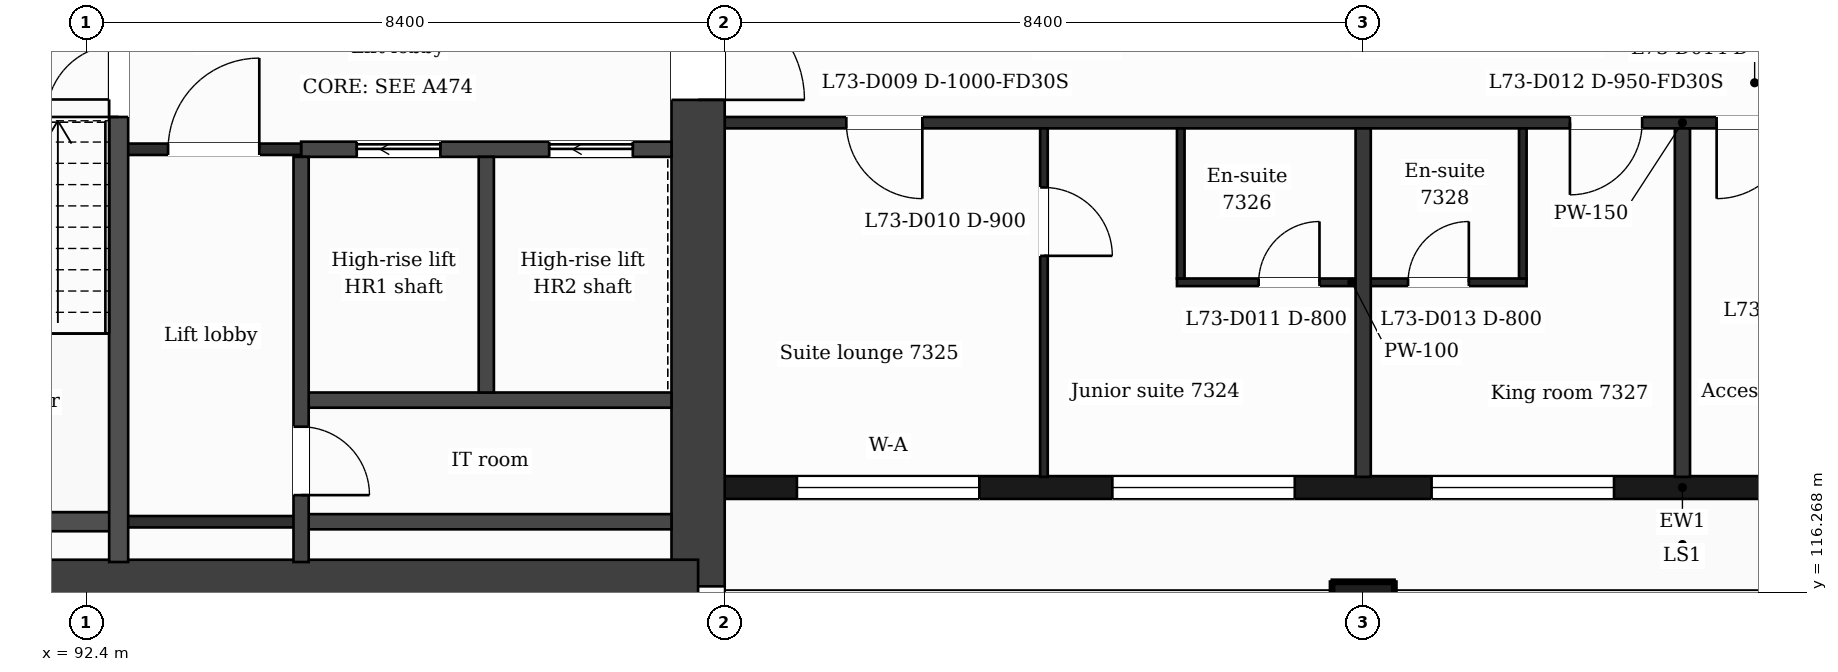
"""IFC4 building model, lengths in metres.
Left out: names, types, materials, properties, quantities, classifications, styles, units other than length and angle.
Written with IfcOpenShell. Run it as: python <this file> out.ifc"""

import sys

from ifc_helpers import new_model, si_unit, direction, frame, frame_2d, origin, origin_2d, place, context, subcontext, project, spatial, rectangle, extrude, element, fill, save


model = new_model("IFC4")
c1 = context("Model", 3, precision=1e-05, world=origin(), true_north=direction((0.0, 1.0)))
c2 = subcontext(c1, "Body", "Model", "MODEL_VIEW")
j1 = project(units=[si_unit("LENGTHUNIT", "METRE"), si_unit("PLANEANGLEUNIT", "RADIAN")], contexts=[c1])
p1 = place(None, origin())
s1 = spatial("IfcSite", under=j1, at=p1, CompositionType="ELEMENT")
p2 = place(p1, origin())
s2 = spatial("IfcBuilding", under=s1, at=p2, CompositionType="ELEMENT")
p3 = place(p2, frame((0.0, 0.0, 299.7)))
s3 = spatial("IfcBuildingStorey", under=s2, at=p3, CompositionType="ELEMENT", Elevation=299.7)
p4 = place(p3, frame((100.45, 132.05, 0.0), z_axis=(0.0, 0.0, 1.0), x_axis=(0.0, -1.0, 0.0)))
e1 = element("IfcWall", 1, at=p4, inside=s3, PredefinedType="SHEAR", context=c2, shape_type="SweptSolid", body=[
    extrude(rectangle(XDim=15.7, YDim=0.7, at=frame_2d((7.85, 0.0))), origin(), (0.0, 0.0, 1.0), 3.7),
])
p5 = place(p4, frame((7.9, 0.0, 0.0)))
e2 = element("IfcOpeningElement", 2, at=p5, cuts=e1, PredefinedType="OPENING", context=c2, shape_type="SweptSolid", body=[
    extrude(rectangle(XDim=1.4, YDim=2.1, at=frame_2d((0.7, 1.05))), frame((0.0, 0.36, 0.0), z_axis=(0.0, -1.0, 0.0), x_axis=(1.0, 0.0, 0.0)), (0.0, 0.0, 1.0), 0.72),
])
p6 = place(p3, frame((100.45, 116.35, 0.0), z_axis=(0.0, 0.0, 1.0), x_axis=(-1.0, 0.0, 0.0)))
e3 = element("IfcWall", 3, at=p6, inside=s3, PredefinedType="SHEAR", context=c2, shape_type="SweptSolid", body=[
    extrude(rectangle(XDim=13.627, YDim=0.7, at=frame_2d((6.813, 0.0))), origin(), (0.0, 0.0, 1.0), 3.7),
])
p7 = place(p3, frame((109.2, 116.0, 0.0), z_axis=(0.0, 0.0, 1.0), x_axis=(1.0, 0.0, 0.0)))
e4 = element("IfcColumn", 4, at=p7, inside=s3, PredefinedType="COLUMN", context=c2, shape_type="SweptSolid", body=[
    extrude(rectangle(XDim=0.8, YDim=0.8, at=origin_2d()), origin(), (0.0, 0.0, 1.0), 3.7),
])
p8 = place(p3, frame((100.8, 117.65, 0.0), z_axis=(0.0, 0.0, 1.0), x_axis=(1.0, 0.0, 0.0)))
e5 = element("IfcWall", 5, at=p8, inside=s3, PredefinedType="SOLIDWALL", context=c2, shape_type="SweptSolid", body=[
    extrude(rectangle(XDim=25.2, YDim=0.3, at=frame_2d((12.6, 0.0))), origin(), (0.0, 0.0, 1.0), 3.25),
])
p9 = place(p8, frame((0.95, 0.0, 0.9)))
e6 = element("IfcOpeningElement", 6, at=p9, cuts=e5, PredefinedType="OPENING", context=c2, shape_type="SweptSolid", body=[
    extrude(rectangle(XDim=2.4, YDim=2.1, at=frame_2d((1.2, 1.05))), frame((0.0, 0.16, 0.0), z_axis=(0.0, -1.0, 0.0), x_axis=(1.0, 0.0, 0.0)), (0.0, 0.0, 1.0), 0.32),
])
p10 = place(p8, frame((5.1, 0.0, 0.9)))
e7 = element("IfcOpeningElement", 7, at=p10, cuts=e5, PredefinedType="OPENING", context=c2, shape_type="SweptSolid", body=[
    extrude(rectangle(XDim=2.4, YDim=2.1, at=frame_2d((1.2, 1.05))), frame((0.0, 0.16, 0.0), z_axis=(0.0, -1.0, 0.0), x_axis=(1.0, 0.0, 0.0)), (0.0, 0.0, 1.0), 0.32),
])
p11 = place(p8, frame((9.3, 0.0, 0.9)))
e8 = element("IfcOpeningElement", 8, at=p11, cuts=e5, PredefinedType="OPENING", context=c2, shape_type="SweptSolid", body=[
    extrude(rectangle(XDim=2.4, YDim=2.1, at=frame_2d((1.2, 1.05))), frame((0.0, 0.16, 0.0), z_axis=(0.0, -1.0, 0.0), x_axis=(1.0, 0.0, 0.0)), (0.0, 0.0, 1.0), 0.32),
])
p12 = place(p8, frame((14.1, 0.0, 0.9)))
e9 = element("IfcOpeningElement", 9, at=p12, cuts=e5, PredefinedType="OPENING", context=c2, shape_type="SweptSolid", body=[
    extrude(rectangle(XDim=1.2, YDim=2.1, at=frame_2d((0.6, 1.05))), frame((0.0, 0.16, 0.0), z_axis=(0.0, -1.0, 0.0), x_axis=(1.0, 0.0, 0.0)), (0.0, 0.0, 1.0), 0.32),
])
p13 = place(p8, frame((18.3, 0.0, 0.9)))
e10 = element("IfcOpeningElement", 10, at=p13, cuts=e5, PredefinedType="OPENING", context=c2, shape_type="SweptSolid", body=[
    extrude(rectangle(XDim=1.2, YDim=2.1, at=frame_2d((0.6, 1.05))), frame((0.0, 0.16, 0.0), z_axis=(0.0, -1.0, 0.0), x_axis=(1.0, 0.0, 0.0)), (0.0, 0.0, 1.0), 0.32),
])
p14 = place(p8, frame((21.75, 0.0, 0.0)))
e11 = element("IfcOpeningElement", 11, at=p14, cuts=e5, PredefinedType="OPENING", context=c2, shape_type="SweptSolid", body=[
    extrude(rectangle(XDim=1.2, YDim=2.4, at=frame_2d((0.6, 1.2))), frame((0.0, 0.16, 0.0), z_axis=(0.0, -1.0, 0.0), x_axis=(1.0, 0.0, 0.0)), (0.0, 0.0, 1.0), 0.32),
])
p15 = place(p8, frame((23.55, 0.0, 0.9)))
e12 = element("IfcOpeningElement", 12, at=p15, cuts=e5, PredefinedType="OPENING", context=c2, shape_type="SweptSolid", body=[
    extrude(rectangle(XDim=1.2, YDim=2.1, at=frame_2d((0.6, 1.05))), frame((0.0, 0.16, 0.0), z_axis=(0.0, -1.0, 0.0), x_axis=(1.0, 0.0, 0.0)), (0.0, 0.0, 1.0), 0.32),
])
p16 = place(p3, frame((95.227, 117.2, 0.0), z_axis=(0.0, 0.0, 1.0), x_axis=(1.0, 0.0, 0.0)))
e13 = element("IfcWall", 13, at=p16, inside=s3, PredefinedType="PARTITIONING", context=c2, shape_type="SweptSolid", body=[
    extrude(rectangle(XDim=4.873, YDim=0.2, at=frame_2d((2.437, 0.0))), origin(), (0.0, 0.0, 1.0), 3.25),
])
p17 = place(p3, frame((92.827, 117.2, 0.0), z_axis=(0.0, 0.0, 1.0), x_axis=(1.0, 0.0, 0.0)))
e14 = element("IfcWall", 14, at=p17, inside=s3, PredefinedType="PARTITIONING", context=c2, shape_type="SweptSolid", body=[
    extrude(rectangle(XDim=2.4, YDim=0.15, at=frame_2d((1.2, 0.0))), origin(), (0.0, 0.0, 1.0), 3.25),
])
p18 = place(p3, frame((89.552, 117.2, 0.0), z_axis=(0.0, 0.0, 1.0), x_axis=(1.0, 0.0, 0.0)))
e15 = element("IfcWall", 15, at=p18, inside=s3, PredefinedType="PARTITIONING", context=c2, shape_type="SweptSolid", body=[
    extrude(rectangle(XDim=3.275, YDim=0.25, at=frame_2d((1.637, 0.0))), origin(), (0.0, 0.0, 1.0), 3.25),
])
p19 = place(p3, frame((95.227, 118.8, 0.0), z_axis=(0.0, 0.0, 1.0), x_axis=(1.0, 0.0, 0.0)))
e16 = element("IfcWall", 16, at=p19, inside=s3, PredefinedType="PARTITIONING", context=c2, shape_type="SweptSolid", body=[
    extrude(rectangle(XDim=4.873, YDim=0.2, at=frame_2d((2.437, 0.0))), origin(), (0.0, 0.0, 1.0), 3.25),
])
p20 = place(p3, frame((106.75, 120.35, 0.0), z_axis=(0.0, 0.0, 1.0), x_axis=(1.0, 0.0, 0.0)))
e17 = element("IfcWall", 17, at=p20, inside=s3, PredefinedType="PARTITIONING", context=c2, shape_type="SweptSolid", body=[
    extrude(rectangle(XDim=4.6, YDim=0.1, at=frame_2d((2.3, 0.0))), origin(), (0.0, 0.0, 1.0), 3.25),
])
p21 = place(p20, frame((1.075, 0.0, 0.0)))
e18 = element("IfcOpeningElement", 18, at=p21, cuts=e17, PredefinedType="OPENING", context=c2, shape_type="SweptSolid", body=[
    extrude(rectangle(XDim=0.8, YDim=2.1, at=frame_2d((0.4, 1.05))), frame((0.0, 0.06, 0.0), z_axis=(0.0, -1.0, 0.0), x_axis=(1.0, 0.0, 0.0)), (0.0, 0.0, 1.0), 0.12),
])
p22 = place(p20, frame((3.04, 0.0, 0.0)))
e19 = element("IfcOpeningElement", 19, at=p22, cuts=e17, PredefinedType="OPENING", context=c2, shape_type="SweptSolid", body=[
    extrude(rectangle(XDim=0.8, YDim=2.1, at=frame_2d((0.4, 1.05))), frame((0.0, 0.06, 0.0), z_axis=(0.0, -1.0, 0.0), x_axis=(1.0, 0.0, 0.0)), (0.0, 0.0, 1.0), 0.12),
])
p23 = place(p3, frame((95.227, 122.1, 0.0), z_axis=(0.0, 0.0, 1.0), x_axis=(1.0, 0.0, 0.0)))
e20 = element("IfcWall", 20, at=p23, inside=s3, PredefinedType="PARTITIONING", context=c2, shape_type="SweptSolid", body=[
    extrude(rectangle(XDim=4.873, YDim=0.2, at=frame_2d((2.437, 0.0))), origin(), (0.0, 0.0, 1.0), 3.25),
])
p24 = place(p23, frame((0.732, 0.0, 0.0)))
e21 = element("IfcOpeningElement", 21, at=p24, cuts=e20, PredefinedType="OPENING", context=c2, shape_type="SweptSolid", body=[
    extrude(rectangle(XDim=1.1, YDim=2.1, at=frame_2d((0.55, 1.05))), frame((0.0, 0.11, 0.0), z_axis=(0.0, -1.0, 0.0), x_axis=(1.0, 0.0, 0.0)), (0.0, 0.0, 1.0), 0.22),
])
p25 = place(p23, frame((3.264, 0.0, 0.0)))
e22 = element("IfcOpeningElement", 22, at=p25, cuts=e20, PredefinedType="OPENING", context=c2, shape_type="SweptSolid", body=[
    extrude(rectangle(XDim=1.1, YDim=2.1, at=frame_2d((0.55, 1.05))), frame((0.0, 0.11, 0.0), z_axis=(0.0, -1.0, 0.0), x_axis=(1.0, 0.0, 0.0)), (0.0, 0.0, 1.0), 0.22),
])
p26 = place(p3, frame((92.827, 122.1, 0.0), z_axis=(0.0, 0.0, 1.0), x_axis=(1.0, 0.0, 0.0)))
e23 = element("IfcWall", 23, at=p26, inside=s3, PredefinedType="PARTITIONING", context=c2, shape_type="SweptSolid", body=[
    extrude(rectangle(XDim=2.4, YDim=0.15, at=frame_2d((1.2, 0.0))), origin(), (0.0, 0.0, 1.0), 3.25),
])
p27 = place(p26, frame((0.65, 0.0, 0.0)))
e24 = element("IfcOpeningElement", 24, at=p27, cuts=e23, PredefinedType="OPENING", context=c2, shape_type="SweptSolid", body=[
    extrude(rectangle(XDim=1.2, YDim=2.1, at=frame_2d((0.6, 1.05))), frame((0.0, 0.085, 0.0), z_axis=(0.0, -1.0, 0.0), x_axis=(1.0, 0.0, 0.0)), (0.0, 0.0, 1.0), 0.17),
])
p28 = place(p3, frame((100.8, 122.45, 0.0), z_axis=(0.0, 0.0, 1.0), x_axis=(1.0, 0.0, 0.0)))
e25 = element("IfcWall", 25, at=p28, inside=s3, PredefinedType="PARTITIONING", context=c2, shape_type="SweptSolid", body=[
    extrude(rectangle(XDim=25.2, YDim=0.15, at=frame_2d((12.6, 0.0))), origin(), (0.0, 0.0, 1.0), 3.25),
])
p29 = place(p28, frame((1.6, 0.0, 0.0)))
e26 = element("IfcOpeningElement", 26, at=p29, cuts=e25, PredefinedType="OPENING", context=c2, shape_type="SweptSolid", body=[
    extrude(rectangle(XDim=1.0, YDim=2.1, at=frame_2d((0.5, 1.05))), frame((0.0, 0.085, 0.0), z_axis=(0.0, -1.0, 0.0), x_axis=(1.0, 0.0, 0.0)), (0.0, 0.0, 1.0), 0.17),
])
p30 = place(p28, frame((11.12, 0.0, 0.0)))
e27 = element("IfcOpeningElement", 27, at=p30, cuts=e25, PredefinedType="OPENING", context=c2, shape_type="SweptSolid", body=[
    extrude(rectangle(XDim=0.95, YDim=2.1, at=frame_2d((0.475, 1.05))), frame((0.0, 0.085, 0.0), z_axis=(0.0, -1.0, 0.0), x_axis=(1.0, 0.0, 0.0)), (0.0, 0.0, 1.0), 0.17),
])
p31 = place(p28, frame((13.05, 0.0, 0.0)))
e28 = element("IfcOpeningElement", 28, at=p31, cuts=e25, PredefinedType="OPENING", context=c2, shape_type="SweptSolid", body=[
    extrude(rectangle(XDim=1.0, YDim=2.1, at=frame_2d((0.5, 1.05))), frame((0.0, 0.085, 0.0), z_axis=(0.0, -1.0, 0.0), x_axis=(1.0, 0.0, 0.0)), (0.0, 0.0, 1.0), 0.17),
])
p32 = place(p28, frame((19.61, 0.0, 0.0)))
e29 = element("IfcOpeningElement", 29, at=p32, cuts=e25, PredefinedType="OPENING", context=c2, shape_type="SweptSolid", body=[
    extrude(rectangle(XDim=0.95, YDim=2.1, at=frame_2d((0.475, 1.05))), frame((0.0, 0.085, 0.0), z_axis=(0.0, -1.0, 0.0), x_axis=(1.0, 0.0, 0.0)), (0.0, 0.0, 1.0), 0.17),
])
p33 = place(p28, frame((21.275, 0.0, 0.0)))
e30 = element("IfcOpeningElement", 30, at=p33, cuts=e25, PredefinedType="OPENING", context=c2, shape_type="SweptSolid", body=[
    extrude(rectangle(XDim=0.95, YDim=2.1, at=frame_2d((0.475, 1.05))), frame((0.0, 0.085, 0.0), z_axis=(0.0, -1.0, 0.0), x_axis=(1.0, 0.0, 0.0)), (0.0, 0.0, 1.0), 0.17),
])
p34 = place(p3, frame((92.827, 116.67, 0.0), z_axis=(0.0, 0.0, 1.0), x_axis=(0.0, 1.0, 0.0)))
e31 = element("IfcWall", 31, at=p34, inside=s3, PredefinedType="PARTITIONING", context=c2, shape_type="SweptSolid", body=[
    extrude(rectangle(XDim=7.155, YDim=0.25, at=frame_2d((3.578, 0.0))), origin(), (0.0, 0.0, 1.0), 3.25),
])
p35 = place(p34, frame((5.855, 0.0, 0.0)))
e32 = element("IfcOpeningElement", 32, at=p35, cuts=e31, PredefinedType="OPENING", context=c2, shape_type="SweptSolid", body=[
    extrude(rectangle(XDim=0.95, YDim=2.1, at=frame_2d((0.475, 1.05))), frame((0.0, 0.135, 0.0), z_axis=(0.0, -1.0, 0.0), x_axis=(1.0, 0.0, 0.0)), (0.0, 0.0, 1.0), 0.27),
])
p36 = place(p3, frame((95.227, 116.67, 0.0), z_axis=(0.0, 0.0, 1.0), x_axis=(0.0, 1.0, 0.0)))
e33 = element("IfcWall", 33, at=p36, inside=s3, PredefinedType="PARTITIONING", context=c2, shape_type="SweptSolid", body=[
    extrude(rectangle(XDim=5.33, YDim=0.2, at=frame_2d((2.665, 0.0))), origin(), (0.0, 0.0, 1.0), 3.25),
])
p37 = place(p36, frame((0.88, 0.0, 0.0)))
e34 = element("IfcOpeningElement", 34, at=p37, cuts=e33, PredefinedType="OPENING", context=c2, shape_type="SweptSolid", body=[
    extrude(rectangle(XDim=0.9, YDim=2.1, at=frame_2d((0.45, 1.05))), frame((0.0, 0.11, 0.0), z_axis=(0.0, -1.0, 0.0), x_axis=(1.0, 0.0, 0.0)), (0.0, 0.0, 1.0), 0.22),
])
p38 = place(p3, frame((97.664, 118.9, 0.0), z_axis=(0.0, 0.0, 1.0), x_axis=(0.0, 1.0, 0.0)))
e35 = element("IfcWall", 35, at=p38, inside=s3, PredefinedType="PARTITIONING", context=c2, shape_type="SweptSolid", body=[
    extrude(rectangle(XDim=3.1, YDim=0.2, at=frame_2d((1.55, 0.0))), origin(), (0.0, 0.0, 1.0), 3.25),
])
p39 = place(p3, frame((105.0, 117.79, 0.0), z_axis=(0.0, 0.0, 1.0), x_axis=(0.0, 1.0, 0.0)))
e36 = element("IfcWall", 36, at=p39, inside=s3, PredefinedType="PARTITIONING", context=c2, shape_type="SweptSolid", body=[
    extrude(rectangle(XDim=4.585, YDim=0.1, at=frame_2d((2.292, 0.0))), origin(), (0.0, 0.0, 1.0), 3.25),
])
p40 = place(p39, frame((2.908, 0.0, 0.0)))
e37 = element("IfcOpeningElement", 37, at=p40, cuts=e36, PredefinedType="OPENING", context=c2, shape_type="SweptSolid", body=[
    extrude(rectangle(XDim=0.9, YDim=2.1, at=frame_2d((0.45, 1.05))), frame((0.0, 0.06, 0.0), z_axis=(0.0, -1.0, 0.0), x_axis=(1.0, 0.0, 0.0)), (0.0, 0.0, 1.0), 0.12),
])
p41 = place(p3, frame((106.8, 120.4, 0.0), z_axis=(0.0, 0.0, 1.0), x_axis=(0.0, 1.0, 0.0)))
e38 = element("IfcWall", 38, at=p41, inside=s3, PredefinedType="PARTITIONING", context=c2, shape_type="SweptSolid", body=[
    extrude(rectangle(XDim=1.975, YDim=0.1, at=frame_2d((0.988, 0.0))), origin(), (0.0, 0.0, 1.0), 3.25),
])
p42 = place(p3, frame((109.2, 117.79, 0.0), z_axis=(0.0, 0.0, 1.0), x_axis=(0.0, 1.0, 0.0)))
e39 = element("IfcWall", 39, at=p42, inside=s3, PredefinedType="PARTITIONING", context=c2, shape_type="SweptSolid", body=[
    extrude(rectangle(XDim=4.585, YDim=0.2, at=frame_2d((2.292, 0.0))), origin(), (0.0, 0.0, 1.0), 3.25),
])
p43 = place(p3, frame((111.3, 120.4, 0.0), z_axis=(0.0, 0.0, 1.0), x_axis=(0.0, 1.0, 0.0)))
e40 = element("IfcWall", 40, at=p43, inside=s3, PredefinedType="PARTITIONING", context=c2, shape_type="SweptSolid", body=[
    extrude(rectangle(XDim=1.975, YDim=0.1, at=frame_2d((0.988, 0.0))), origin(), (0.0, 0.0, 1.0), 3.25),
])
p44 = place(p3, frame((113.4, 117.79, 0.0), z_axis=(0.0, 0.0, 1.0), x_axis=(0.0, 1.0, 0.0)))
e41 = element("IfcWall", 41, at=p44, inside=s3, PredefinedType="PARTITIONING", context=c2, shape_type="SweptSolid", body=[
    extrude(rectangle(XDim=4.585, YDim=0.2, at=frame_2d((2.292, 0.0))), origin(), (0.0, 0.0, 1.0), 3.25),
])
p45 = place(p9, origin())
e42 = element("IfcWindow", 42, at=p45, inside=s3, PartitioningType="SINGLE_PANEL", PredefinedType="WINDOW", context=c2, shape_type="SweptSolid", body=[
    extrude(rectangle(XDim=2.4, YDim=2.1, at=frame_2d((1.2, 1.05))), frame((0.0, 0.03, 0.0), z_axis=(0.0, -1.0, 0.0), x_axis=(1.0, 0.0, 0.0)), (0.0, 0.0, 1.0), 0.06),
])
fill(e6, e42)
p46 = place(p10, origin())
e43 = element("IfcWindow", 43, at=p46, inside=s3, PartitioningType="SINGLE_PANEL", PredefinedType="WINDOW", context=c2, shape_type="SweptSolid", body=[
    extrude(rectangle(XDim=2.4, YDim=2.1, at=frame_2d((1.2, 1.05))), frame((0.0, 0.03, 0.0), z_axis=(0.0, -1.0, 0.0), x_axis=(1.0, 0.0, 0.0)), (0.0, 0.0, 1.0), 0.06),
])
fill(e7, e43)
p47 = place(p11, origin())
e44 = element("IfcWindow", 44, at=p47, inside=s3, PartitioningType="SINGLE_PANEL", PredefinedType="WINDOW", context=c2, shape_type="SweptSolid", body=[
    extrude(rectangle(XDim=2.4, YDim=2.1, at=frame_2d((1.2, 1.05))), frame((0.0, 0.03, 0.0), z_axis=(0.0, -1.0, 0.0), x_axis=(1.0, 0.0, 0.0)), (0.0, 0.0, 1.0), 0.06),
])
fill(e8, e44)
p48 = place(p27, origin())
e45 = element("IfcDoor", 45, at=p48, inside=s3, OperationType="SINGLE_SWING_RIGHT", PredefinedType="DOOR", context=c2, shape_type="SweptSolid", body=[
    extrude(rectangle(XDim=1.2, YDim=2.1, at=frame_2d((0.6, 1.05))), frame((0.0, 0.025, 0.0), z_axis=(0.0, -1.0, 0.0), x_axis=(1.0, 0.0, 0.0)), (0.0, 0.0, 1.0), 0.05),
])
fill(e24, e45)
p49 = place(p24, origin())
e46 = element("IfcDoor", 46, at=p49, inside=s3, OperationType="SLIDING_TO_LEFT", PredefinedType="DOOR", context=c2, shape_type="SweptSolid", body=[
    extrude(rectangle(XDim=1.1, YDim=2.1, at=frame_2d((0.55, 1.05))), frame((0.0, 0.025, 0.0), z_axis=(0.0, -1.0, 0.0), x_axis=(1.0, 0.0, 0.0)), (0.0, 0.0, 1.0), 0.05),
])
fill(e21, e46)
p50 = place(p25, origin())
e47 = element("IfcDoor", 47, at=p50, inside=s3, OperationType="SLIDING_TO_LEFT", PredefinedType="DOOR", context=c2, shape_type="SweptSolid", body=[
    extrude(rectangle(XDim=1.1, YDim=2.1, at=frame_2d((0.55, 1.05))), frame((0.0, 0.025, 0.0), z_axis=(0.0, -1.0, 0.0), x_axis=(1.0, 0.0, 0.0)), (0.0, 0.0, 1.0), 0.05),
])
fill(e22, e47)
p51 = place(p35, origin())
e48 = element("IfcDoor", 48, at=p51, inside=s3, OperationType="SINGLE_SWING_LEFT", PredefinedType="DOOR", context=c2, shape_type="SweptSolid", body=[
    extrude(rectangle(XDim=0.95, YDim=2.1, at=frame_2d((0.475, 1.05))), frame((0.0, 0.025, 0.0), z_axis=(0.0, -1.0, 0.0), x_axis=(1.0, 0.0, 0.0)), (0.0, 0.0, 1.0), 0.05),
])
fill(e32, e48)
p52 = place(p37, origin())
e49 = element("IfcDoor", 49, at=p52, inside=s3, OperationType="SINGLE_SWING_LEFT", PredefinedType="DOOR", context=c2, shape_type="SweptSolid", body=[
    extrude(rectangle(XDim=0.9, YDim=2.1, at=frame_2d((0.45, 1.05))), frame((0.0, 0.025, 0.0), z_axis=(0.0, -1.0, 0.0), x_axis=(1.0, 0.0, 0.0)), (0.0, 0.0, 1.0), 0.05),
])
fill(e34, e49)
p53 = place(p29, origin())
e50 = element("IfcDoor", 50, at=p53, inside=s3, OperationType="SINGLE_SWING_RIGHT", PredefinedType="DOOR", context=c2, shape_type="SweptSolid", body=[
    extrude(rectangle(XDim=1.0, YDim=2.1, at=frame_2d((0.5, 1.05))), frame((0.0, 0.025, 0.0), z_axis=(0.0, -1.0, 0.0), x_axis=(1.0, 0.0, 0.0)), (0.0, 0.0, 1.0), 0.05),
])
fill(e26, e50)
p54 = place(p40, origin())
e51 = element("IfcDoor", 51, at=p54, inside=s3, OperationType="SINGLE_SWING_LEFT", PredefinedType="DOOR", context=c2, shape_type="SweptSolid", body=[
    extrude(rectangle(XDim=0.9, YDim=2.1, at=frame_2d((0.45, 1.05))), frame((0.0, 0.025, 0.0), z_axis=(0.0, -1.0, 0.0), x_axis=(1.0, 0.0, 0.0)), (0.0, 0.0, 1.0), 0.05),
])
fill(e37, e51)
p55 = place(p21, origin())
e52 = element("IfcDoor", 52, at=p55, inside=s3, OperationType="SINGLE_SWING_RIGHT", PredefinedType="DOOR", context=c2, shape_type="SweptSolid", body=[
    extrude(rectangle(XDim=0.8, YDim=2.1, at=frame_2d((0.4, 1.05))), frame((0.0, 0.025, 0.0), z_axis=(0.0, -1.0, 0.0), x_axis=(1.0, 0.0, 0.0)), (0.0, 0.0, 1.0), 0.05),
])
fill(e18, e52)
p56 = place(p30, origin())
e53 = element("IfcDoor", 53, at=p56, inside=s3, OperationType="SINGLE_SWING_LEFT", PredefinedType="DOOR", context=c2, shape_type="SweptSolid", body=[
    extrude(rectangle(XDim=0.95, YDim=2.1, at=frame_2d((0.475, 1.05))), frame((0.0, 0.025, 0.0), z_axis=(0.0, -1.0, 0.0), x_axis=(1.0, 0.0, 0.0)), (0.0, 0.0, 1.0), 0.05),
])
fill(e27, e53)
p57 = place(p22, origin())
e54 = element("IfcDoor", 54, at=p57, inside=s3, OperationType="SINGLE_SWING_RIGHT", PredefinedType="DOOR", context=c2, shape_type="SweptSolid", body=[
    extrude(rectangle(XDim=0.8, YDim=2.1, at=frame_2d((0.4, 1.05))), frame((0.0, 0.025, 0.0), z_axis=(0.0, -1.0, 0.0), x_axis=(1.0, 0.0, 0.0)), (0.0, 0.0, 1.0), 0.05),
])
fill(e19, e54)
p58 = place(p31, origin())
e55 = element("IfcDoor", 55, at=p58, inside=s3, OperationType="SINGLE_SWING_LEFT", PredefinedType="DOOR", context=c2, shape_type="SweptSolid", body=[
    extrude(rectangle(XDim=1.0, YDim=2.1, at=frame_2d((0.5, 1.05))), frame((0.0, 0.025, 0.0), z_axis=(0.0, -1.0, 0.0), x_axis=(1.0, 0.0, 0.0)), (0.0, 0.0, 1.0), 0.05),
])
fill(e28, e55)
p59 = place(p5, origin())
e56 = element("IfcDoor", 56, at=p59, inside=s3, OperationType="SINGLE_SWING_RIGHT", PredefinedType="DOOR", context=c2, shape_type="SweptSolid", body=[
    extrude(rectangle(XDim=1.4, YDim=2.1, at=frame_2d((0.7, 1.05))), frame((0.0, 0.025, 0.0), z_axis=(0.0, -1.0, 0.0), x_axis=(1.0, 0.0, 0.0)), (0.0, 0.0, 1.0), 0.05),
])
fill(e2, e56)
save(model, sys.argv[1])
